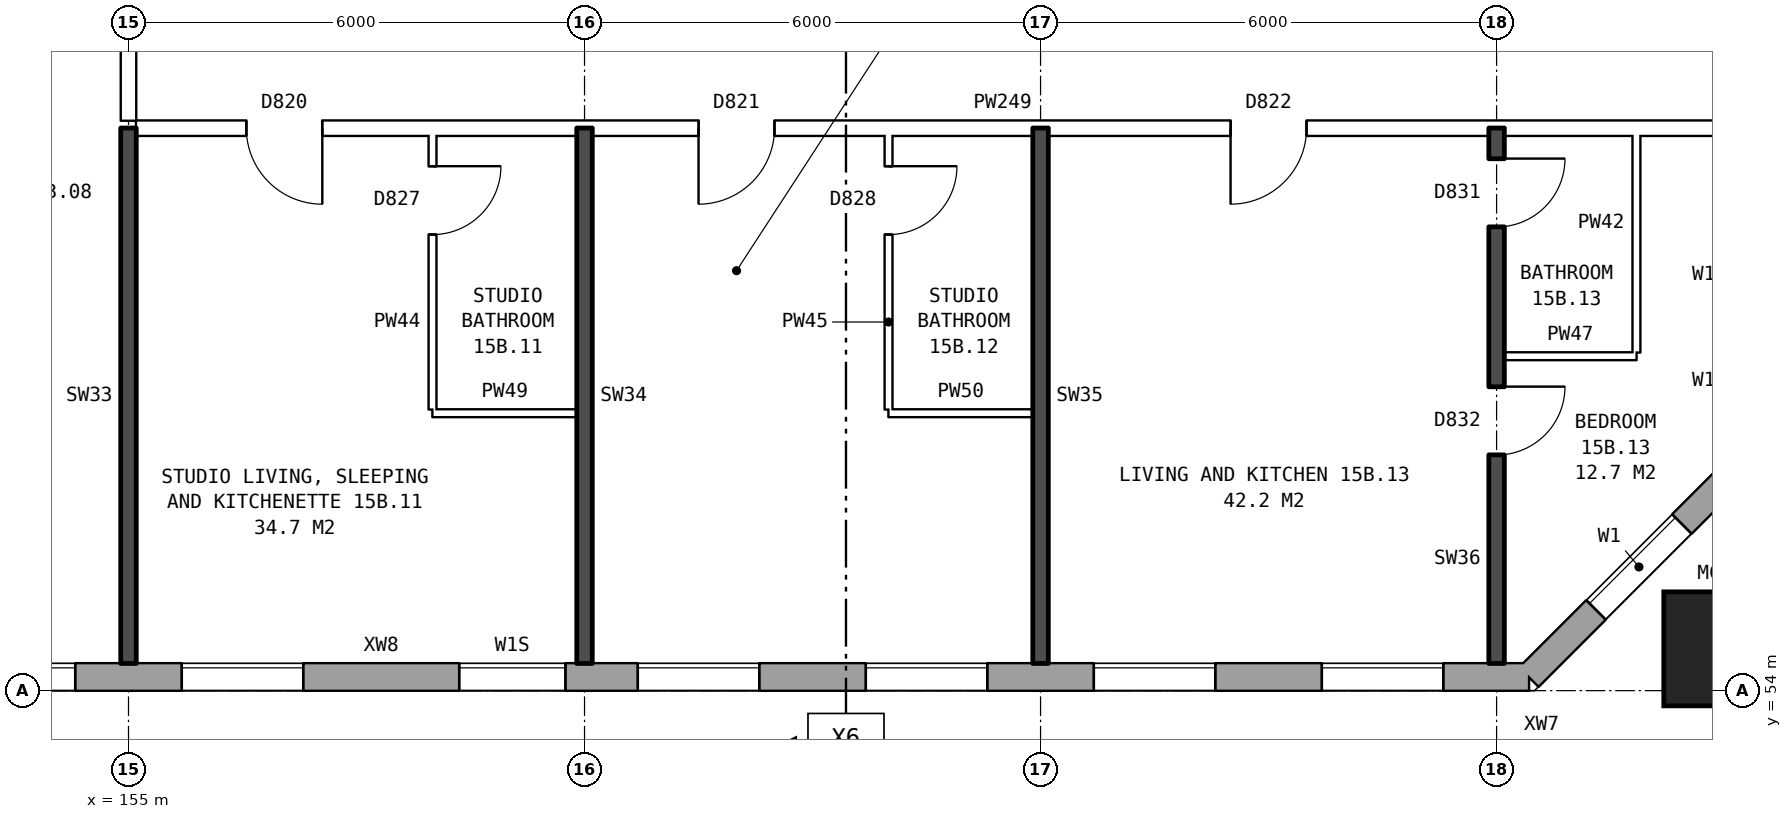
"""IFC4 building model, lengths in metres.
Left out: names, types, materials, properties, quantities, classifications, styles, units other than length and angle.
Written with IfcOpenShell. Run it as: python <this file> out.ifc"""

import sys

from ifc_helpers import new_model, si_unit, direction, frame, frame_2d, origin, origin_2d, place, context, subcontext, project, spatial, rectangle, hollow_rectangle, extrude, element, fill, save


model = new_model("IFC4")
c1 = context("Model", 3, precision=1e-05, world=origin(), true_north=direction((0.0, 1.0)))
c2 = subcontext(c1, "Body", "Model", "MODEL_VIEW")
j1 = project(units=[si_unit("LENGTHUNIT", "METRE"), si_unit("PLANEANGLEUNIT", "RADIAN")], contexts=[c1])
p1 = place(None, origin())
s1 = spatial("IfcSite", under=j1, at=p1, CompositionType="ELEMENT")
p2 = place(p1, origin())
s2 = spatial("IfcBuilding", under=s1, at=p2, CompositionType="ELEMENT")
p3 = place(p2, frame((0.0, 0.0, 56.7)))
s3 = spatial("IfcBuildingStorey", under=s2, at=p3, CompositionType="ELEMENT", Elevation=56.7)
p4 = place(p3, frame((175.95, 54.55, 0.0), z_axis=(0.0, 0.0, 1.0), x_axis=(1.0, 0.0, 0.0)))
e1 = element("IfcColumn", 1, at=p4, inside=s3, PredefinedType="COLUMN", context=c2, shape_type="SweptSolid", body=[
    extrude(hollow_rectangle(XDim=1.5, YDim=1.5, WallThickness=0.08, at=origin_2d()), origin(), (0.0, 0.0, 1.0), 3.1),
])
p5 = place(p3, frame((134.075, 54.18, 0.0), z_axis=(0.0, 0.0, 1.0), x_axis=(1.0, 0.0, 0.0)))
e2 = element("IfcWall", 2, at=p5, inside=s3, PredefinedType="STANDARD", context=c2, shape_type="SweptSolid", body=[
    extrude(rectangle(XDim=39.351, YDim=0.36, at=frame_2d((19.675, 0.0))), origin(), (0.0, 0.0, 1.0), 2.85),
])
p6 = place(p5, frame((0.625, 0.0, 0.8)))
e3 = element("IfcOpeningElement", 3, at=p6, cuts=e2, PredefinedType="OPENING", context=c2, shape_type="SweptSolid", body=[
    extrude(rectangle(XDim=1.6, YDim=1.8, at=frame_2d((0.8, 0.9))), frame((0.0, 0.19, 0.0), z_axis=(0.0, -1.0, 0.0), x_axis=(1.0, 0.0, 0.0)), (0.0, 0.0, 1.0), 0.38),
])
p7 = place(p5, frame((3.625, 0.0, 0.8)))
e4 = element("IfcOpeningElement", 4, at=p7, cuts=e2, PredefinedType="OPENING", context=c2, shape_type="SweptSolid", body=[
    extrude(rectangle(XDim=1.6, YDim=1.8, at=frame_2d((0.8, 0.9))), frame((0.0, 0.19, 0.0), z_axis=(0.0, -1.0, 0.0), x_axis=(1.0, 0.0, 0.0)), (0.0, 0.0, 1.0), 0.38),
])
p8 = place(p5, frame((6.625, 0.0, 0.8)))
e5 = element("IfcOpeningElement", 5, at=p8, cuts=e2, PredefinedType="OPENING", context=c2, shape_type="SweptSolid", body=[
    extrude(rectangle(XDim=1.6, YDim=1.8, at=frame_2d((0.8, 0.9))), frame((0.0, 0.19, 0.0), z_axis=(0.0, -1.0, 0.0), x_axis=(1.0, 0.0, 0.0)), (0.0, 0.0, 1.0), 0.38),
])
p9 = place(p5, frame((9.625, 0.0, 0.8)))
e6 = element("IfcOpeningElement", 6, at=p9, cuts=e2, PredefinedType="OPENING", context=c2, shape_type="SweptSolid", body=[
    extrude(rectangle(XDim=1.6, YDim=1.8, at=frame_2d((0.8, 0.9))), frame((0.0, 0.19, 0.0), z_axis=(0.0, -1.0, 0.0), x_axis=(1.0, 0.0, 0.0)), (0.0, 0.0, 1.0), 0.38),
])
p10 = place(p5, frame((12.075, 0.0, 0.8)))
e7 = element("IfcOpeningElement", 7, at=p10, cuts=e2, PredefinedType="OPENING", context=c2, shape_type="SweptSolid", body=[
    extrude(rectangle(XDim=0.8, YDim=1.8, at=frame_2d((0.4, 0.9))), frame((0.0, 0.19, 0.0), z_axis=(0.0, -1.0, 0.0), x_axis=(1.0, 0.0, 0.0)), (0.0, 0.0, 1.0), 0.38),
])
p11 = place(p5, frame((15.275, 0.0, 0.8)))
e8 = element("IfcOpeningElement", 8, at=p11, cuts=e2, PredefinedType="OPENING", context=c2, shape_type="SweptSolid", body=[
    extrude(rectangle(XDim=0.8, YDim=0.9, at=frame_2d((0.4, 0.45))), frame((0.0, 0.19, 0.0), z_axis=(0.0, -1.0, 0.0), x_axis=(1.0, 0.0, 0.0)), (0.0, 0.0, 1.0), 0.38),
])
p12 = place(p5, frame((18.625, 0.0, 0.8)))
e9 = element("IfcOpeningElement", 9, at=p12, cuts=e2, PredefinedType="OPENING", context=c2, shape_type="SweptSolid", body=[
    extrude(rectangle(XDim=1.6, YDim=1.8, at=frame_2d((0.8, 0.9))), frame((0.0, 0.19, 0.0), z_axis=(0.0, -1.0, 0.0), x_axis=(1.0, 0.0, 0.0)), (0.0, 0.0, 1.0), 0.38),
])
p13 = place(p5, frame((21.625, 0.0, 0.8)))
e10 = element("IfcOpeningElement", 10, at=p13, cuts=e2, PredefinedType="OPENING", context=c2, shape_type="SweptSolid", body=[
    extrude(rectangle(XDim=1.6, YDim=1.8, at=frame_2d((0.8, 0.9))), frame((0.0, 0.19, 0.0), z_axis=(0.0, -1.0, 0.0), x_axis=(1.0, 0.0, 0.0)), (0.0, 0.0, 1.0), 0.38),
])
p14 = place(p5, frame((25.275, 0.0, 1.7)))
e11 = element("IfcOpeningElement", 11, at=p14, cuts=e2, PredefinedType="OPENING", context=c2, shape_type="SweptSolid", body=[
    extrude(rectangle(XDim=1.4, YDim=0.9, at=frame_2d((0.7, 0.45))), frame((0.0, 0.19, 0.0), z_axis=(0.0, -1.0, 0.0), x_axis=(1.0, 0.0, 0.0)), (0.0, 0.0, 1.0), 0.38),
])
p15 = place(p5, frame((27.625, 0.0, 0.8)))
e12 = element("IfcOpeningElement", 12, at=p15, cuts=e2, PredefinedType="OPENING", context=c2, shape_type="SweptSolid", body=[
    extrude(rectangle(XDim=1.6, YDim=1.8, at=frame_2d((0.8, 0.9))), frame((0.0, 0.19, 0.0), z_axis=(0.0, -1.0, 0.0), x_axis=(1.0, 0.0, 0.0)), (0.0, 0.0, 1.0), 0.38),
])
p16 = place(p5, frame((30.625, 0.0, 0.8)))
e13 = element("IfcOpeningElement", 13, at=p16, cuts=e2, PredefinedType="OPENING", context=c2, shape_type="SweptSolid", body=[
    extrude(rectangle(XDim=1.6, YDim=1.8, at=frame_2d((0.8, 0.9))), frame((0.0, 0.19, 0.0), z_axis=(0.0, -1.0, 0.0), x_axis=(1.0, 0.0, 0.0)), (0.0, 0.0, 1.0), 0.38),
])
p17 = place(p5, frame((33.625, 0.0, 0.8)))
e14 = element("IfcOpeningElement", 14, at=p17, cuts=e2, PredefinedType="OPENING", context=c2, shape_type="SweptSolid", body=[
    extrude(rectangle(XDim=1.6, YDim=1.8, at=frame_2d((0.8, 0.9))), frame((0.0, 0.19, 0.0), z_axis=(0.0, -1.0, 0.0), x_axis=(1.0, 0.0, 0.0)), (0.0, 0.0, 1.0), 0.38),
])
p18 = place(p5, frame((36.625, 0.0, 0.8)))
e15 = element("IfcOpeningElement", 15, at=p18, cuts=e2, PredefinedType="OPENING", context=c2, shape_type="SweptSolid", body=[
    extrude(rectangle(XDim=1.6, YDim=1.8, at=frame_2d((0.8, 0.9))), frame((0.0, 0.19, 0.0), z_axis=(0.0, -1.0, 0.0), x_axis=(1.0, 0.0, 0.0)), (0.0, 0.0, 1.0), 0.38),
])
p19 = place(p5, frame((13.175, 0.0, 1.7)))
e16 = element("IfcOpeningElement", 16, at=p19, cuts=e2, PredefinedType="OPENING", context=c2, shape_type="SweptSolid", body=[
    extrude(rectangle(XDim=0.8, YDim=0.9, at=frame_2d((0.4, 0.45))), frame((0.0, 0.19, 0.0), z_axis=(0.0, -1.0, 0.0), x_axis=(1.0, 0.0, 0.0)), (0.0, 0.0, 1.0), 0.38),
])
p20 = place(p5, frame((16.375, 0.0, 0.8)))
e17 = element("IfcOpeningElement", 17, at=p20, cuts=e2, PredefinedType="OPENING", context=c2, shape_type="SweptSolid", body=[
    extrude(rectangle(XDim=1.4, YDim=1.8, at=frame_2d((0.7, 0.9))), frame((0.0, 0.19, 0.0), z_axis=(0.0, -1.0, 0.0), x_axis=(1.0, 0.0, 0.0)), (0.0, 0.0, 1.0), 0.38),
])
p21 = place(p3, frame((173.425, 54.18, 0.0), z_axis=(0.0, 0.0, 1.0), x_axis=(0.707106781187, 0.707106781187, 0.0)))
e18 = element("IfcWall", 18, at=p21, inside=s3, PredefinedType="STANDARD", context=c2, shape_type="SweptSolid", body=[
    extrude(rectangle(XDim=4.094, YDim=0.36, at=frame_2d((2.047, 0.0))), origin(), (0.0, 0.0, 1.0), 2.85),
])
p22 = place(p21, frame((1.247, 0.0, 0.8)))
e19 = element("IfcOpeningElement", 19, at=p22, cuts=e18, PredefinedType="OPENING", context=c2, shape_type="SweptSolid", body=[
    extrude(rectangle(XDim=1.6, YDim=1.8, at=frame_2d((0.8, 0.9))), frame((0.0, 0.19, 0.0), z_axis=(0.0, -1.0, 0.0), x_axis=(1.0, 0.0, 0.0)), (0.0, 0.0, 1.0), 0.38),
])
for number, where, z_axis, x_axis in (
    (20, (159.0, 57.65, 0.0), (0.0, 0.0, 1.0), (1.0, 0.0, 0.0)),
    (21, (165.0, 57.65, 0.0), (0.0, 0.0, 1.0), (1.0, 0.0, 0.0)),
):
    element("IfcWall", number, at=place(p3, frame(where, z_axis=z_axis, x_axis=x_axis)), inside=s3, PredefinedType="PARTITIONING", context=c2, shape_type="SweptSolid", body=[
        extrude(rectangle(XDim=1.9, YDim=0.1, at=frame_2d((0.95, 0.0))), origin(), (0.0, 0.0, 1.0), 2.85),
    ])
p23 = place(p3, frame((173.1, 58.4, 0.0), z_axis=(0.0, 0.0, 1.0), x_axis=(1.0, 0.0, 0.0)))
e22 = element("IfcWall", 22, at=p23, inside=s3, PredefinedType="PARTITIONING", context=c2, shape_type="SweptSolid", body=[
    extrude(rectangle(XDim=1.74, YDim=0.1, at=frame_2d((0.87, 0.0))), origin(), (0.0, 0.0, 1.0), 2.85),
])
p24 = place(p3, frame((155.1, 61.4, 0.0), z_axis=(0.0, 0.0, 1.0), x_axis=(1.0, 0.0, 0.0)))
e23 = element("IfcWall", 23, at=p24, inside=s3, PredefinedType="PARTITIONING", context=c2, shape_type="SweptSolid", body=[
    extrude(rectangle(XDim=21.04, YDim=0.2, at=frame_2d((10.52, 0.0))), origin(), (0.0, 0.0, 1.0), 2.85),
])
p25 = place(p24, frame((1.45, 0.0, 0.0)))
e24 = element("IfcOpeningElement", 24, at=p25, cuts=e23, PredefinedType="OPENING", context=c2, shape_type="SweptSolid", body=[
    extrude(rectangle(XDim=1.0, YDim=2.1, at=frame_2d((0.5, 1.05))), frame((0.0, 0.11, 0.0), z_axis=(0.0, -1.0, 0.0), x_axis=(1.0, 0.0, 0.0)), (0.0, 0.0, 1.0), 0.22),
])
p26 = place(p24, frame((7.4, 0.0, 0.0)))
e25 = element("IfcOpeningElement", 25, at=p26, cuts=e23, PredefinedType="OPENING", context=c2, shape_type="SweptSolid", body=[
    extrude(rectangle(XDim=1.0, YDim=2.1, at=frame_2d((0.5, 1.05))), frame((0.0, 0.11, 0.0), z_axis=(0.0, -1.0, 0.0), x_axis=(1.0, 0.0, 0.0)), (0.0, 0.0, 1.0), 0.22),
])
p27 = place(p24, frame((14.4, 0.0, 0.0)))
e26 = element("IfcOpeningElement", 26, at=p27, cuts=e23, PredefinedType="OPENING", context=c2, shape_type="SweptSolid", body=[
    extrude(rectangle(XDim=1.0, YDim=2.1, at=frame_2d((0.5, 1.05))), frame((0.0, 0.11, 0.0), z_axis=(0.0, -1.0, 0.0), x_axis=(1.0, 0.0, 0.0)), (0.0, 0.0, 1.0), 0.22),
])
p28 = place(p3, frame((155.0, 54.36, 0.0), z_axis=(0.0, 0.0, 1.0), x_axis=(0.0, 1.0, 0.0)))
e27 = element("IfcWall", 27, at=p28, inside=s3, PredefinedType="SOLIDWALL", context=c2, shape_type="SweptSolid", body=[
    extrude(rectangle(XDim=7.04, YDim=0.2, at=frame_2d((3.52, 0.0))), origin(), (0.0, 0.0, 1.0), 2.85),
])
p29 = place(p3, frame((155.0, 61.5, 0.0), z_axis=(0.0, 0.0, 1.0), x_axis=(0.0, 1.0, 0.0)))
e28 = element("IfcWall", 28, at=p29, inside=s3, PredefinedType="PARTITIONING", context=c2, shape_type="SweptSolid", body=[
    extrude(rectangle(XDim=2.2, YDim=0.2, at=frame_2d((1.1, 0.0))), origin(), (0.0, 0.0, 1.0), 2.85),
])
p30 = place(p3, frame((159.0, 57.7, 0.0), z_axis=(0.0, 0.0, 1.0), x_axis=(0.0, 1.0, 0.0)))
e29 = element("IfcWall", 29, at=p30, inside=s3, PredefinedType="PARTITIONING", context=c2, shape_type="SweptSolid", body=[
    extrude(rectangle(XDim=3.6, YDim=0.1, at=frame_2d((1.8, 0.0))), origin(), (0.0, 0.0, 1.0), 2.85),
])
p31 = place(p30, frame((2.3, 0.0, 0.0)))
e30 = element("IfcOpeningElement", 30, at=p31, cuts=e29, PredefinedType="OPENING", context=c2, shape_type="SweptSolid", body=[
    extrude(rectangle(XDim=0.9, YDim=2.1, at=frame_2d((0.45, 1.05))), frame((0.0, 0.06, 0.0), z_axis=(0.0, -1.0, 0.0), x_axis=(1.0, 0.0, 0.0)), (0.0, 0.0, 1.0), 0.12),
])
p32 = place(p3, frame((161.0, 54.36, 0.0), z_axis=(0.0, 0.0, 1.0), x_axis=(0.0, 1.0, 0.0)))
e31 = element("IfcWall", 31, at=p32, inside=s3, PredefinedType="SOLIDWALL", context=c2, shape_type="SweptSolid", body=[
    extrude(rectangle(XDim=7.04, YDim=0.2, at=frame_2d((3.52, 0.0))), origin(), (0.0, 0.0, 1.0), 2.85),
])
p33 = place(p3, frame((165.0, 57.7, 0.0), z_axis=(0.0, 0.0, 1.0), x_axis=(0.0, 1.0, 0.0)))
e32 = element("IfcWall", 32, at=p33, inside=s3, PredefinedType="PARTITIONING", context=c2, shape_type="SweptSolid", body=[
    extrude(rectangle(XDim=3.6, YDim=0.1, at=frame_2d((1.8, 0.0))), origin(), (0.0, 0.0, 1.0), 2.85),
])
p34 = place(p33, frame((2.3, 0.0, 0.0)))
e33 = element("IfcOpeningElement", 33, at=p34, cuts=e32, PredefinedType="OPENING", context=c2, shape_type="SweptSolid", body=[
    extrude(rectangle(XDim=0.9, YDim=2.1, at=frame_2d((0.45, 1.05))), frame((0.0, 0.06, 0.0), z_axis=(0.0, -1.0, 0.0), x_axis=(1.0, 0.0, 0.0)), (0.0, 0.0, 1.0), 0.12),
])
p35 = place(p3, frame((167.0, 54.36, 0.0), z_axis=(0.0, 0.0, 1.0), x_axis=(0.0, 1.0, 0.0)))
e34 = element("IfcWall", 34, at=p35, inside=s3, PredefinedType="SOLIDWALL", context=c2, shape_type="SweptSolid", body=[
    extrude(rectangle(XDim=7.04, YDim=0.2, at=frame_2d((3.52, 0.0))), origin(), (0.0, 0.0, 1.0), 2.85),
])
p36 = place(p3, frame((173.0, 54.36, 0.0), z_axis=(0.0, 0.0, 1.0), x_axis=(0.0, 1.0, 0.0)))
e35 = element("IfcWall", 35, at=p36, inside=s3, PredefinedType="SOLIDWALL", context=c2, shape_type="SweptSolid", body=[
    extrude(rectangle(XDim=7.04, YDim=0.2, at=frame_2d((3.52, 0.0))), origin(), (0.0, 0.0, 1.0), 2.85),
])
p37 = place(p36, frame((2.74, 0.0, 0.0)))
e36 = element("IfcOpeningElement", 36, at=p37, cuts=e35, PredefinedType="OPENING", context=c2, shape_type="SweptSolid", body=[
    extrude(rectangle(XDim=0.9, YDim=2.1, at=frame_2d((0.45, 1.05))), frame((0.0, 0.11, 0.0), z_axis=(0.0, -1.0, 0.0), x_axis=(1.0, 0.0, 0.0)), (0.0, 0.0, 1.0), 0.22),
])
p38 = place(p36, frame((5.74, 0.0, 0.0)))
e37 = element("IfcOpeningElement", 37, at=p38, cuts=e35, PredefinedType="OPENING", context=c2, shape_type="SweptSolid", body=[
    extrude(rectangle(XDim=0.9, YDim=2.1, at=frame_2d((0.45, 1.05))), frame((0.0, 0.11, 0.0), z_axis=(0.0, -1.0, 0.0), x_axis=(1.0, 0.0, 0.0)), (0.0, 0.0, 1.0), 0.22),
])
p39 = place(p3, frame((174.84, 58.45, 0.0), z_axis=(0.0, 0.0, 1.0), x_axis=(0.0, 1.0, 0.0)))
e38 = element("IfcWall", 38, at=p39, inside=s3, PredefinedType="PARTITIONING", context=c2, shape_type="SweptSolid", body=[
    extrude(rectangle(XDim=2.85, YDim=0.1, at=frame_2d((1.425, 0.0))), origin(), (0.0, 0.0, 1.0), 2.85),
])
p40 = place(p12, origin())
e39 = element("IfcWindow", 39, at=p40, inside=s3, PartitioningType="SINGLE_PANEL", PredefinedType="WINDOW", context=c2, shape_type="SweptSolid", body=[
    extrude(rectangle(XDim=1.6, YDim=1.8, at=frame_2d((0.8, 0.9))), frame((0.0, 0.15, 0.0), z_axis=(0.0, -1.0, 0.0), x_axis=(1.0, 0.0, 0.0)), (0.0, 0.0, 1.0), 0.06),
])
fill(e9, e39)
p41 = place(p13, origin())
e40 = element("IfcWindow", 40, at=p41, inside=s3, PartitioningType="SINGLE_PANEL", PredefinedType="WINDOW", context=c2, shape_type="SweptSolid", body=[
    extrude(rectangle(XDim=1.6, YDim=1.8, at=frame_2d((0.8, 0.9))), frame((0.0, 0.15, 0.0), z_axis=(0.0, -1.0, 0.0), x_axis=(1.0, 0.0, 0.0)), (0.0, 0.0, 1.0), 0.06),
])
fill(e10, e40)
p42 = place(p14, origin())
e41 = element("IfcWindow", 41, at=p42, inside=s3, PartitioningType="SINGLE_PANEL", PredefinedType="WINDOW", context=c2, shape_type="SweptSolid", body=[
    extrude(rectangle(XDim=1.4, YDim=0.9, at=frame_2d((0.7, 0.45))), frame((0.0, 0.15, 0.0), z_axis=(0.0, -1.0, 0.0), x_axis=(1.0, 0.0, 0.0)), (0.0, 0.0, 1.0), 0.06),
])
fill(e11, e41)
p43 = place(p15, origin())
e42 = element("IfcWindow", 42, at=p43, inside=s3, PartitioningType="SINGLE_PANEL", PredefinedType="WINDOW", context=c2, shape_type="SweptSolid", body=[
    extrude(rectangle(XDim=1.6, YDim=1.8, at=frame_2d((0.8, 0.9))), frame((0.0, 0.15, 0.0), z_axis=(0.0, -1.0, 0.0), x_axis=(1.0, 0.0, 0.0)), (0.0, 0.0, 1.0), 0.06),
])
fill(e12, e42)
p44 = place(p16, origin())
e43 = element("IfcWindow", 43, at=p44, inside=s3, PartitioningType="SINGLE_PANEL", PredefinedType="WINDOW", context=c2, shape_type="SweptSolid", body=[
    extrude(rectangle(XDim=1.6, YDim=1.8, at=frame_2d((0.8, 0.9))), frame((0.0, 0.15, 0.0), z_axis=(0.0, -1.0, 0.0), x_axis=(1.0, 0.0, 0.0)), (0.0, 0.0, 1.0), 0.06),
])
fill(e13, e43)
p45 = place(p17, origin())
e44 = element("IfcWindow", 44, at=p45, inside=s3, PartitioningType="SINGLE_PANEL", PredefinedType="WINDOW", context=c2, shape_type="SweptSolid", body=[
    extrude(rectangle(XDim=1.6, YDim=1.8, at=frame_2d((0.8, 0.9))), frame((0.0, 0.15, 0.0), z_axis=(0.0, -1.0, 0.0), x_axis=(1.0, 0.0, 0.0)), (0.0, 0.0, 1.0), 0.06),
])
fill(e14, e44)
p46 = place(p18, origin())
e45 = element("IfcWindow", 45, at=p46, inside=s3, PartitioningType="SINGLE_PANEL", PredefinedType="WINDOW", context=c2, shape_type="SweptSolid", body=[
    extrude(rectangle(XDim=1.6, YDim=1.8, at=frame_2d((0.8, 0.9))), frame((0.0, 0.15, 0.0), z_axis=(0.0, -1.0, 0.0), x_axis=(1.0, 0.0, 0.0)), (0.0, 0.0, 1.0), 0.06),
])
fill(e15, e45)
p47 = place(p22, origin())
e46 = element("IfcWindow", 46, at=p47, inside=s3, PartitioningType="SINGLE_PANEL", PredefinedType="WINDOW", context=c2, shape_type="SweptSolid", body=[
    extrude(rectangle(XDim=1.6, YDim=1.8, at=frame_2d((0.8, 0.9))), frame((0.0, 0.15, 0.0), z_axis=(0.0, -1.0, 0.0), x_axis=(1.0, 0.0, 0.0)), (0.0, 0.0, 1.0), 0.06),
])
fill(e19, e46)
p48 = place(p25, frame((1.0, 0.0, 0.0), z_axis=(0.0, 0.0, 1.0), x_axis=(-1.0, 0.0, 0.0)))
e47 = element("IfcDoor", 47, at=p48, inside=s3, OperationType="SINGLE_SWING_LEFT", PredefinedType="DOOR", context=c2, shape_type="SweptSolid", body=[
    extrude(rectangle(XDim=1.0, YDim=2.1, at=frame_2d((0.5, 1.05))), frame((0.0, 0.025, 0.0), z_axis=(0.0, -1.0, 0.0), x_axis=(1.0, 0.0, 0.0)), (0.0, 0.0, 1.0), 0.05),
])
fill(e24, e47)
p49 = place(p31, frame((0.9, 0.0, 0.0), z_axis=(0.0, 0.0, 1.0), x_axis=(-1.0, 0.0, 0.0)))
e48 = element("IfcDoor", 48, at=p49, inside=s3, OperationType="SINGLE_SWING_LEFT", PredefinedType="DOOR", context=c2, shape_type="SweptSolid", body=[
    extrude(rectangle(XDim=0.9, YDim=2.1, at=frame_2d((0.45, 1.05))), frame((0.0, 0.025, 0.0), z_axis=(0.0, -1.0, 0.0), x_axis=(1.0, 0.0, 0.0)), (0.0, 0.0, 1.0), 0.05),
])
fill(e30, e48)
p50 = place(p26, frame((1.0, 0.0, 0.0), z_axis=(0.0, 0.0, 1.0), x_axis=(-1.0, 0.0, 0.0)))
e49 = element("IfcDoor", 49, at=p50, inside=s3, OperationType="SINGLE_SWING_RIGHT", PredefinedType="DOOR", context=c2, shape_type="SweptSolid", body=[
    extrude(rectangle(XDim=1.0, YDim=2.1, at=frame_2d((0.5, 1.05))), frame((0.0, 0.025, 0.0), z_axis=(0.0, -1.0, 0.0), x_axis=(1.0, 0.0, 0.0)), (0.0, 0.0, 1.0), 0.05),
])
fill(e25, e49)
p51 = place(p34, frame((0.9, 0.0, 0.0), z_axis=(0.0, 0.0, 1.0), x_axis=(-1.0, 0.0, 0.0)))
e50 = element("IfcDoor", 50, at=p51, inside=s3, OperationType="SINGLE_SWING_LEFT", PredefinedType="DOOR", context=c2, shape_type="SweptSolid", body=[
    extrude(rectangle(XDim=0.9, YDim=2.1, at=frame_2d((0.45, 1.05))), frame((0.0, 0.025, 0.0), z_axis=(0.0, -1.0, 0.0), x_axis=(1.0, 0.0, 0.0)), (0.0, 0.0, 1.0), 0.05),
])
fill(e33, e50)
p52 = place(p37, frame((0.9, 0.0, 0.0), z_axis=(0.0, 0.0, 1.0), x_axis=(-1.0, 0.0, 0.0)))
e51 = element("IfcDoor", 51, at=p52, inside=s3, OperationType="SINGLE_SWING_LEFT", PredefinedType="DOOR", context=c2, shape_type="SweptSolid", body=[
    extrude(rectangle(XDim=0.9, YDim=2.1, at=frame_2d((0.45, 1.05))), frame((0.0, 0.025, 0.0), z_axis=(0.0, -1.0, 0.0), x_axis=(1.0, 0.0, 0.0)), (0.0, 0.0, 1.0), 0.05),
])
fill(e36, e51)
p53 = place(p27, frame((1.0, 0.0, 0.0), z_axis=(0.0, 0.0, 1.0), x_axis=(-1.0, 0.0, 0.0)))
e52 = element("IfcDoor", 52, at=p53, inside=s3, OperationType="SINGLE_SWING_RIGHT", PredefinedType="DOOR", context=c2, shape_type="SweptSolid", body=[
    extrude(rectangle(XDim=1.0, YDim=2.1, at=frame_2d((0.5, 1.05))), frame((0.0, 0.025, 0.0), z_axis=(0.0, -1.0, 0.0), x_axis=(1.0, 0.0, 0.0)), (0.0, 0.0, 1.0), 0.05),
])
fill(e26, e52)
p54 = place(p38, frame((0.9, 0.0, 0.0), z_axis=(0.0, 0.0, 1.0), x_axis=(-1.0, 0.0, 0.0)))
e53 = element("IfcDoor", 53, at=p54, inside=s3, OperationType="SINGLE_SWING_LEFT", PredefinedType="DOOR", context=c2, shape_type="SweptSolid", body=[
    extrude(rectangle(XDim=0.9, YDim=2.1, at=frame_2d((0.45, 1.05))), frame((0.0, 0.025, 0.0), z_axis=(0.0, -1.0, 0.0), x_axis=(1.0, 0.0, 0.0)), (0.0, 0.0, 1.0), 0.05),
])
fill(e37, e53)
save(model, sys.argv[1])
